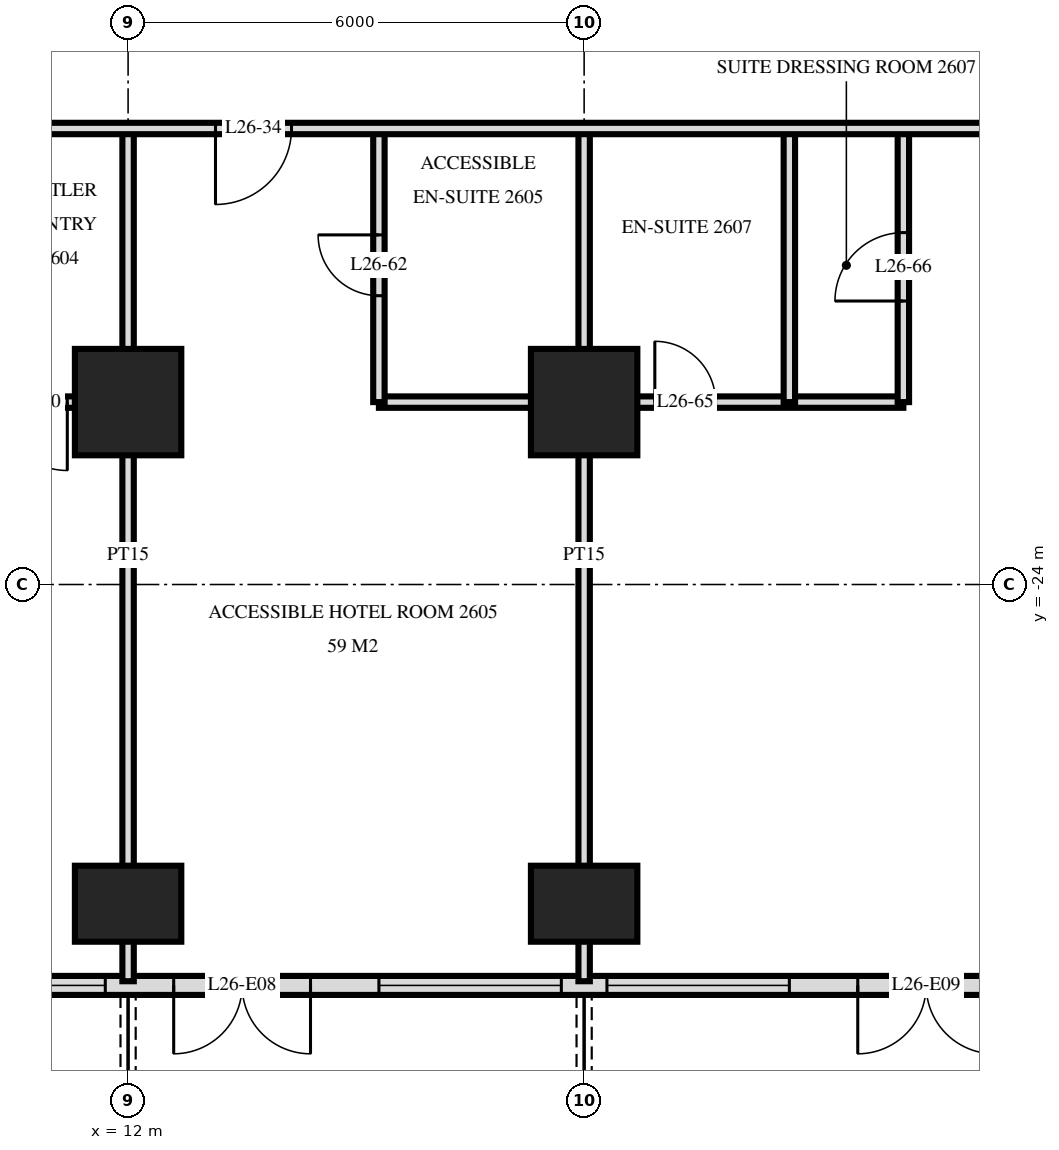
"""IFC4 building model, lengths in metres.
Left out: names, types, materials, properties, quantities, classifications, styles, units other than length and angle.
Written with IfcOpenShell. Run it as: python <this file> out.ifc"""

import sys

from ifc_helpers import new_model, si_unit, direction, frame, frame_2d, origin, origin_2d, place, context, subcontext, project, spatial, rectangle, extrude, element, fill, save


model = new_model("IFC4")
c1 = context("Model", 3, precision=1e-05, world=origin(), true_north=direction((0.0, 1.0)))
c2 = subcontext(c1, "Body", "Model", "MODEL_VIEW")
j1 = project(units=[si_unit("LENGTHUNIT", "METRE"), si_unit("PLANEANGLEUNIT", "RADIAN")], contexts=[c1])
p1 = place(None, origin())
s1 = spatial("IfcSite", under=j1, at=p1, CompositionType="ELEMENT")
p2 = place(p1, origin())
s2 = spatial("IfcBuilding", under=s1, at=p2, CompositionType="ELEMENT")
p3 = place(p2, frame((0.0, 0.0, 103.2)))
s3 = spatial("IfcBuildingStorey", under=s2, at=p3, CompositionType="ELEMENT", Elevation=103.2)
p4 = place(p3, frame((12.0, -28.2, 0.0), z_axis=(0.0, 0.0, 1.0), x_axis=(1.0, 0.0, 0.0)))
e1 = element("IfcColumn", 1, at=p4, inside=s3, PredefinedType="COLUMN", context=c2, shape_type="SweptSolid", body=[
    extrude(rectangle(XDim=1.4, YDim=1.0, at=origin_2d()), origin(), (0.0, 0.0, 1.0), 3.6),
])
p5 = place(p3, frame((12.0, -21.6, 0.0), z_axis=(0.0, 0.0, 1.0), x_axis=(1.0, 0.0, 0.0)))
e2 = element("IfcColumn", 2, at=p5, inside=s3, PredefinedType="COLUMN", context=c2, shape_type="SweptSolid", body=[
    extrude(rectangle(XDim=1.4, YDim=1.4, at=origin_2d()), origin(), (0.0, 0.0, 1.0), 3.6),
])
p6 = place(p3, frame((18.0, -28.2, 0.0), z_axis=(0.0, 0.0, 1.0), x_axis=(1.0, 0.0, 0.0)))
e3 = element("IfcColumn", 3, at=p6, inside=s3, PredefinedType="COLUMN", context=c2, shape_type="SweptSolid", body=[
    extrude(rectangle(XDim=1.4, YDim=1.0, at=origin_2d()), origin(), (0.0, 0.0, 1.0), 3.6),
])
p7 = place(p3, frame((18.0, -21.6, 0.0), z_axis=(0.0, 0.0, 1.0), x_axis=(1.0, 0.0, 0.0)))
e4 = element("IfcColumn", 4, at=p7, inside=s3, PredefinedType="COLUMN", context=c2, shape_type="SweptSolid", body=[
    extrude(rectangle(XDim=1.4, YDim=1.4, at=origin_2d()), origin(), (0.0, 0.0, 1.0), 3.6),
])
p8 = place(p3, frame((-28.775, -29.275, 0.0), z_axis=(0.0, 0.0, 1.0), x_axis=(1.0, 0.0, 0.0)))
e5 = element("IfcWall", 5, at=p8, inside=s3, PredefinedType="SOLIDWALL", context=c2, shape_type="SweptSolid", body=[
    extrude(rectangle(XDim=57.551, YDim=0.25, at=frame_2d((28.775, 0.0))), origin(), (0.0, 0.0, 1.0), 3.3),
])
p9 = place(p8, frame((0.575, 0.0, 0.0)))
e6 = element("IfcOpeningElement", 6, at=p9, cuts=e5, PredefinedType="OPENING", context=c2, shape_type="SweptSolid", body=[
    extrude(rectangle(XDim=1.8, YDim=2.4, at=frame_2d((0.9, 1.2))), frame((0.0, 0.135, 0.0), z_axis=(0.0, -1.0, 0.0), x_axis=(1.0, 0.0, 0.0)), (0.0, 0.0, 1.0), 0.27),
])
p10 = place(p8, frame((5.375, 0.0, 0.0)))
e7 = element("IfcOpeningElement", 7, at=p10, cuts=e5, PredefinedType="OPENING", context=c2, shape_type="SweptSolid", body=[
    extrude(rectangle(XDim=1.8, YDim=2.4, at=frame_2d((0.9, 1.2))), frame((0.0, 0.135, 0.0), z_axis=(0.0, -1.0, 0.0), x_axis=(1.0, 0.0, 0.0)), (0.0, 0.0, 1.0), 0.27),
])
p11 = place(p8, frame((8.075, 0.0, 0.3)))
e8 = element("IfcOpeningElement", 8, at=p11, cuts=e5, PredefinedType="OPENING", context=c2, shape_type="SweptSolid", body=[
    extrude(rectangle(XDim=2.4, YDim=2.1, at=frame_2d((1.2, 1.05))), frame((0.0, 0.135, 0.0), z_axis=(0.0, -1.0, 0.0), x_axis=(1.0, 0.0, 0.0)), (0.0, 0.0, 1.0), 0.27),
])
p12 = place(p8, frame((11.375, 0.0, 0.0)))
e9 = element("IfcOpeningElement", 9, at=p12, cuts=e5, PredefinedType="OPENING", context=c2, shape_type="SweptSolid", body=[
    extrude(rectangle(XDim=1.8, YDim=2.4, at=frame_2d((0.9, 1.2))), frame((0.0, 0.135, 0.0), z_axis=(0.0, -1.0, 0.0), x_axis=(1.0, 0.0, 0.0)), (0.0, 0.0, 1.0), 0.27),
])
p13 = place(p8, frame((14.075, 0.0, 0.3)))
e10 = element("IfcOpeningElement", 10, at=p13, cuts=e5, PredefinedType="OPENING", context=c2, shape_type="SweptSolid", body=[
    extrude(rectangle(XDim=2.4, YDim=2.1, at=frame_2d((1.2, 1.05))), frame((0.0, 0.135, 0.0), z_axis=(0.0, -1.0, 0.0), x_axis=(1.0, 0.0, 0.0)), (0.0, 0.0, 1.0), 0.27),
])
p14 = place(p8, frame((17.375, 0.0, 0.0)))
e11 = element("IfcOpeningElement", 11, at=p14, cuts=e5, PredefinedType="OPENING", context=c2, shape_type="SweptSolid", body=[
    extrude(rectangle(XDim=1.8, YDim=2.4, at=frame_2d((0.9, 1.2))), frame((0.0, 0.135, 0.0), z_axis=(0.0, -1.0, 0.0), x_axis=(1.0, 0.0, 0.0)), (0.0, 0.0, 1.0), 0.27),
])
p15 = place(p8, frame((20.075, 0.0, 0.3)))
e12 = element("IfcOpeningElement", 12, at=p15, cuts=e5, PredefinedType="OPENING", context=c2, shape_type="SweptSolid", body=[
    extrude(rectangle(XDim=2.4, YDim=2.1, at=frame_2d((1.2, 1.05))), frame((0.0, 0.135, 0.0), z_axis=(0.0, -1.0, 0.0), x_axis=(1.0, 0.0, 0.0)), (0.0, 0.0, 1.0), 0.27),
])
p16 = place(p8, frame((23.075, 0.0, 0.3)))
e13 = element("IfcOpeningElement", 13, at=p16, cuts=e5, PredefinedType="OPENING", context=c2, shape_type="SweptSolid", body=[
    extrude(rectangle(XDim=2.4, YDim=2.1, at=frame_2d((1.2, 1.05))), frame((0.0, 0.135, 0.0), z_axis=(0.0, -1.0, 0.0), x_axis=(1.0, 0.0, 0.0)), (0.0, 0.0, 1.0), 0.27),
])
p17 = place(p8, frame((26.375, 0.0, 0.0)))
e14 = element("IfcOpeningElement", 14, at=p17, cuts=e5, PredefinedType="OPENING", context=c2, shape_type="SweptSolid", body=[
    extrude(rectangle(XDim=1.8, YDim=2.4, at=frame_2d((0.9, 1.2))), frame((0.0, 0.135, 0.0), z_axis=(0.0, -1.0, 0.0), x_axis=(1.0, 0.0, 0.0)), (0.0, 0.0, 1.0), 0.27),
])
p18 = place(p8, frame((29.075, 0.0, 0.3)))
e15 = element("IfcOpeningElement", 15, at=p18, cuts=e5, PredefinedType="OPENING", context=c2, shape_type="SweptSolid", body=[
    extrude(rectangle(XDim=2.4, YDim=2.1, at=frame_2d((1.2, 1.05))), frame((0.0, 0.135, 0.0), z_axis=(0.0, -1.0, 0.0), x_axis=(1.0, 0.0, 0.0)), (0.0, 0.0, 1.0), 0.27),
])
p19 = place(p8, frame((32.375, 0.0, 0.0)))
e16 = element("IfcOpeningElement", 16, at=p19, cuts=e5, PredefinedType="OPENING", context=c2, shape_type="SweptSolid", body=[
    extrude(rectangle(XDim=1.8, YDim=2.4, at=frame_2d((0.9, 1.2))), frame((0.0, 0.135, 0.0), z_axis=(0.0, -1.0, 0.0), x_axis=(1.0, 0.0, 0.0)), (0.0, 0.0, 1.0), 0.27),
])
p20 = place(p8, frame((35.375, 0.0, 0.0)))
e17 = element("IfcOpeningElement", 17, at=p20, cuts=e5, PredefinedType="OPENING", context=c2, shape_type="SweptSolid", body=[
    extrude(rectangle(XDim=1.8, YDim=2.4, at=frame_2d((0.9, 1.2))), frame((0.0, 0.135, 0.0), z_axis=(0.0, -1.0, 0.0), x_axis=(1.0, 0.0, 0.0)), (0.0, 0.0, 1.0), 0.27),
])
p21 = place(p8, frame((38.075, 0.0, 0.3)))
e18 = element("IfcOpeningElement", 18, at=p21, cuts=e5, PredefinedType="OPENING", context=c2, shape_type="SweptSolid", body=[
    extrude(rectangle(XDim=2.4, YDim=2.1, at=frame_2d((1.2, 1.05))), frame((0.0, 0.135, 0.0), z_axis=(0.0, -1.0, 0.0), x_axis=(1.0, 0.0, 0.0)), (0.0, 0.0, 1.0), 0.27),
])
p22 = place(p8, frame((41.375, 0.0, 0.0)))
e19 = element("IfcOpeningElement", 19, at=p22, cuts=e5, PredefinedType="OPENING", context=c2, shape_type="SweptSolid", body=[
    extrude(rectangle(XDim=1.8, YDim=2.4, at=frame_2d((0.9, 1.2))), frame((0.0, 0.135, 0.0), z_axis=(0.0, -1.0, 0.0), x_axis=(1.0, 0.0, 0.0)), (0.0, 0.0, 1.0), 0.27),
])
p23 = place(p8, frame((44.075, 0.0, 0.3)))
e20 = element("IfcOpeningElement", 20, at=p23, cuts=e5, PredefinedType="OPENING", context=c2, shape_type="SweptSolid", body=[
    extrude(rectangle(XDim=2.4, YDim=2.1, at=frame_2d((1.2, 1.05))), frame((0.0, 0.135, 0.0), z_axis=(0.0, -1.0, 0.0), x_axis=(1.0, 0.0, 0.0)), (0.0, 0.0, 1.0), 0.27),
])
p24 = place(p8, frame((47.075, 0.0, 0.3)))
e21 = element("IfcOpeningElement", 21, at=p24, cuts=e5, PredefinedType="OPENING", context=c2, shape_type="SweptSolid", body=[
    extrude(rectangle(XDim=2.4, YDim=2.1, at=frame_2d((1.2, 1.05))), frame((0.0, 0.135, 0.0), z_axis=(0.0, -1.0, 0.0), x_axis=(1.0, 0.0, 0.0)), (0.0, 0.0, 1.0), 0.27),
])
p25 = place(p8, frame((50.375, 0.0, 0.0)))
e22 = element("IfcOpeningElement", 22, at=p25, cuts=e5, PredefinedType="OPENING", context=c2, shape_type="SweptSolid", body=[
    extrude(rectangle(XDim=1.8, YDim=2.4, at=frame_2d((0.9, 1.2))), frame((0.0, 0.135, 0.0), z_axis=(0.0, -1.0, 0.0), x_axis=(1.0, 0.0, 0.0)), (0.0, 0.0, 1.0), 0.27),
])
p26 = place(p8, frame((53.375, 0.0, 0.0)))
e23 = element("IfcOpeningElement", 23, at=p26, cuts=e5, PredefinedType="OPENING", context=c2, shape_type="SweptSolid", body=[
    extrude(rectangle(XDim=1.8, YDim=2.4, at=frame_2d((0.9, 1.2))), frame((0.0, 0.135, 0.0), z_axis=(0.0, -1.0, 0.0), x_axis=(1.0, 0.0, 0.0)), (0.0, 0.0, 1.0), 0.27),
])
p27 = place(p3, frame((22.2, -21.6, 0.0), z_axis=(0.0, 0.0, 1.0), x_axis=(0.0, 1.0, 0.0)))
e24 = element("IfcWall", 24, at=p27, inside=s3, PredefinedType="PARTITIONING", context=c2, shape_type="SweptSolid", body=[
    extrude(rectangle(XDim=3.6, YDim=0.15, at=frame_2d((1.8, 0.0))), origin(), (0.0, 0.0, 1.0), 3.32),
])
p28 = place(p27, frame((1.33, 0.0, 0.0)))
e25 = element("IfcOpeningElement", 25, at=p28, cuts=e24, PredefinedType="OPENING", context=c2, shape_type="SweptSolid", body=[
    extrude(rectangle(XDim=0.9, YDim=2.1, at=frame_2d((0.45, 1.05))), frame((0.0, 0.085, 0.0), z_axis=(0.0, -1.0, 0.0), x_axis=(1.0, 0.0, 0.0)), (0.0, 0.0, 1.0), 0.17),
])
p29 = place(p3, frame((20.7, -21.6, 0.0), z_axis=(0.0, 0.0, 1.0), x_axis=(0.0, 1.0, 0.0)))
e26 = element("IfcWall", 26, at=p29, inside=s3, PredefinedType="PARTITIONING", context=c2, shape_type="SweptSolid", body=[
    extrude(rectangle(XDim=3.6, YDim=0.15, at=frame_2d((1.8, 0.0))), origin(), (0.0, 0.0, 1.0), 3.32),
])
p30 = place(p3, frame((18.0, -29.22, 0.0), z_axis=(0.0, 0.0, 1.0), x_axis=(0.0, 1.0, 0.0)))
e27 = element("IfcWall", 27, at=p30, inside=s3, PredefinedType="PARTITIONING", context=c2, shape_type="SweptSolid", body=[
    extrude(rectangle(XDim=11.22, YDim=0.15, at=frame_2d((5.61, 0.0))), origin(), (0.0, 0.0, 1.0), 3.32),
])
p31 = place(p3, frame((15.3, -21.6, 0.0), z_axis=(0.0, 0.0, 1.0), x_axis=(0.0, 1.0, 0.0)))
e28 = element("IfcWall", 28, at=p31, inside=s3, PredefinedType="PARTITIONING", context=c2, shape_type="SweptSolid", body=[
    extrude(rectangle(XDim=3.6, YDim=0.15, at=frame_2d((1.8, 0.0))), origin(), (0.0, 0.0, 1.0), 3.32),
])
p32 = place(p31, frame((1.4, 0.0, 0.0)))
e29 = element("IfcOpeningElement", 29, at=p32, cuts=e28, PredefinedType="OPENING", context=c2, shape_type="SweptSolid", body=[
    extrude(rectangle(XDim=0.8, YDim=2.1, at=frame_2d((0.4, 1.05))), frame((0.0, 0.085, 0.0), z_axis=(0.0, -1.0, 0.0), x_axis=(1.0, 0.0, 0.0)), (0.0, 0.0, 1.0), 0.17),
])
p33 = place(p3, frame((12.0, -29.22, 0.0), z_axis=(0.0, 0.0, 1.0), x_axis=(0.0, 1.0, 0.0)))
e30 = element("IfcWall", 30, at=p33, inside=s3, PredefinedType="PARTITIONING", context=c2, shape_type="SweptSolid", body=[
    extrude(rectangle(XDim=11.22, YDim=0.15, at=frame_2d((5.61, 0.0))), origin(), (0.0, 0.0, 1.0), 3.32),
])
p34 = place(p3, frame((4.2, -21.6, 0.0), z_axis=(0.0, 0.0, 1.0), x_axis=(1.0, 0.0, 0.0)))
e31 = element("IfcWall", 31, at=p34, inside=s3, PredefinedType="PARTITIONING", context=c2, shape_type="SweptSolid", body=[
    extrude(rectangle(XDim=7.8, YDim=0.15, at=frame_2d((3.9, 0.0))), origin(), (0.0, 0.0, 1.0), 3.32),
])
p35 = place(p34, frame((0.2, 0.0, 0.0)))
e32 = element("IfcOpeningElement", 32, at=p35, cuts=e31, PredefinedType="OPENING", context=c2, shape_type="SweptSolid", body=[
    extrude(rectangle(XDim=0.8, YDim=2.1, at=frame_2d((0.4, 1.05))), frame((0.0, 0.085, 0.0), z_axis=(0.0, -1.0, 0.0), x_axis=(1.0, 0.0, 0.0)), (0.0, 0.0, 1.0), 0.17),
])
p36 = place(p34, frame((4.03, 0.0, 0.0)))
e33 = element("IfcOpeningElement", 33, at=p36, cuts=e31, PredefinedType="OPENING", context=c2, shape_type="SweptSolid", body=[
    extrude(rectangle(XDim=0.9, YDim=2.1, at=frame_2d((0.45, 1.05))), frame((0.0, 0.085, 0.0), z_axis=(0.0, -1.0, 0.0), x_axis=(1.0, 0.0, 0.0)), (0.0, 0.0, 1.0), 0.17),
])
p37 = place(p34, frame((6.1, 0.0, 0.0)))
e34 = element("IfcOpeningElement", 34, at=p37, cuts=e31, PredefinedType="OPENING", context=c2, shape_type="SweptSolid", body=[
    extrude(rectangle(XDim=0.9, YDim=2.1, at=frame_2d((0.45, 1.05))), frame((0.0, 0.085, 0.0), z_axis=(0.0, -1.0, 0.0), x_axis=(1.0, 0.0, 0.0)), (0.0, 0.0, 1.0), 0.17),
])
p38 = place(p3, frame((15.3, -21.6, 0.0), z_axis=(0.0, 0.0, 1.0), x_axis=(1.0, 0.0, 0.0)))
e35 = element("IfcWall", 35, at=p38, inside=s3, PredefinedType="PARTITIONING", context=c2, shape_type="SweptSolid", body=[
    extrude(rectangle(XDim=6.9, YDim=0.15, at=frame_2d((3.45, 0.0))), origin(), (0.0, 0.0, 1.0), 3.32),
])
p39 = place(p38, frame((3.63, 0.0, 0.0)))
e36 = element("IfcOpeningElement", 36, at=p39, cuts=e35, PredefinedType="OPENING", context=c2, shape_type="SweptSolid", body=[
    extrude(rectangle(XDim=0.8, YDim=2.1, at=frame_2d((0.4, 1.05))), frame((0.0, 0.085, 0.0), z_axis=(0.0, -1.0, 0.0), x_axis=(1.0, 0.0, 0.0)), (0.0, 0.0, 1.0), 0.17),
])
p40 = place(p3, frame((-33.12, -18.0, 0.0), z_axis=(0.0, 0.0, 1.0), x_axis=(1.0, 0.0, 0.0)))
e37 = element("IfcWall", 37, at=p40, inside=s3, PredefinedType="PARTITIONING", context=c2, shape_type="SweptSolid", body=[
    extrude(rectangle(XDim=66.24, YDim=0.15, at=frame_2d((33.12, 0.0))), origin(), (0.0, 0.0, 1.0), 3.32),
])
p41 = place(p40, frame((14.02, 0.0, 0.0)))
e38 = element("IfcOpeningElement", 38, at=p41, cuts=e37, PredefinedType="OPENING", context=c2, shape_type="SweptSolid", body=[
    extrude(rectangle(XDim=1.0, YDim=2.1, at=frame_2d((0.5, 1.05))), frame((0.0, 0.085, 0.0), z_axis=(0.0, -1.0, 0.0), x_axis=(1.0, 0.0, 0.0)), (0.0, 0.0, 1.0), 0.17),
])
p42 = place(p40, frame((18.82, 0.0, 0.0)))
e39 = element("IfcOpeningElement", 39, at=p42, cuts=e37, PredefinedType="OPENING", context=c2, shape_type="SweptSolid", body=[
    extrude(rectangle(XDim=1.0, YDim=2.1, at=frame_2d((0.5, 1.05))), frame((0.0, 0.085, 0.0), z_axis=(0.0, -1.0, 0.0), x_axis=(1.0, 0.0, 0.0)), (0.0, 0.0, 1.0), 0.17),
])
p43 = place(p40, frame((30.27, 0.0, 0.0)))
e40 = element("IfcOpeningElement", 40, at=p43, cuts=e37, PredefinedType="OPENING", context=c2, shape_type="SweptSolid", body=[
    extrude(rectangle(XDim=1.0, YDim=2.1, at=frame_2d((0.5, 1.05))), frame((0.0, 0.085, 0.0), z_axis=(0.0, -1.0, 0.0), x_axis=(1.0, 0.0, 0.0)), (0.0, 0.0, 1.0), 0.17),
])
p44 = place(p40, frame((33.82, 0.0, 0.0)))
e41 = element("IfcOpeningElement", 41, at=p44, cuts=e37, PredefinedType="OPENING", context=c2, shape_type="SweptSolid", body=[
    extrude(rectangle(XDim=1.0, YDim=2.1, at=frame_2d((0.5, 1.05))), frame((0.0, 0.085, 0.0), z_axis=(0.0, -1.0, 0.0), x_axis=(1.0, 0.0, 0.0)), (0.0, 0.0, 1.0), 0.17),
])
p45 = place(p40, frame((46.27, 0.0, 0.0)))
e42 = element("IfcOpeningElement", 42, at=p45, cuts=e37, PredefinedType="OPENING", context=c2, shape_type="SweptSolid", body=[
    extrude(rectangle(XDim=1.0, YDim=2.1, at=frame_2d((0.5, 1.05))), frame((0.0, 0.085, 0.0), z_axis=(0.0, -1.0, 0.0), x_axis=(1.0, 0.0, 0.0)), (0.0, 0.0, 1.0), 0.17),
])
p46 = place(p40, frame((6.07, 0.0, 0.0)))
e43 = element("IfcOpeningElement", 43, at=p46, cuts=e37, PredefinedType="OPENING", context=c2, shape_type="SweptSolid", body=[
    extrude(rectangle(XDim=1.0, YDim=2.1, at=frame_2d((0.5, 1.05))), frame((0.0, 0.085, 0.0), z_axis=(0.0, -1.0, 0.0), x_axis=(1.0, 0.0, 0.0)), (0.0, 0.0, 1.0), 0.17),
])
p47 = place(p40, frame((60.37, 0.0, 0.0)))
e44 = element("IfcOpeningElement", 44, at=p47, cuts=e37, PredefinedType="OPENING", context=c2, shape_type="SweptSolid", body=[
    extrude(rectangle(XDim=1.0, YDim=2.1, at=frame_2d((0.5, 1.05))), frame((0.0, 0.085, 0.0), z_axis=(0.0, -1.0, 0.0), x_axis=(1.0, 0.0, 0.0)), (0.0, 0.0, 1.0), 0.17),
])
p48 = place(p21, origin())
e45 = element("IfcWindow", 45, at=p48, inside=s3, PartitioningType="SINGLE_PANEL", PredefinedType="WINDOW", context=c2, shape_type="SweptSolid", body=[
    extrude(rectangle(XDim=2.4, YDim=2.1, at=frame_2d((1.2, 1.05))), frame((0.0, 0.03, 0.0), z_axis=(0.0, -1.0, 0.0), x_axis=(1.0, 0.0, 0.0)), (0.0, 0.0, 1.0), 0.06),
])
fill(e18, e45)
p49 = place(p22, frame((0.9, 0.0, 0.0), z_axis=(0.0, 0.0, 1.0), x_axis=(-1.0, 0.0, 0.0)))
e46 = element("IfcDoor", 46, at=p49, inside=s3, OperationType="DOUBLE_DOOR_SINGLE_SWING", PredefinedType="DOOR", context=c2, shape_type="SweptSolid", body=[
    extrude(rectangle(XDim=1.8, YDim=2.4, at=frame_2d((0.0, 1.2))), frame((0.0, -0.025, 0.0), z_axis=(0.0, 1.0, 0.0), x_axis=(-1.0, 0.0, 0.0)), (0.0, 0.0, 1.0), 0.05),
])
fill(e19, e46)
p50 = place(p23, origin())
e47 = element("IfcWindow", 47, at=p50, inside=s3, PartitioningType="SINGLE_PANEL", PredefinedType="WINDOW", context=c2, shape_type="SweptSolid", body=[
    extrude(rectangle(XDim=2.4, YDim=2.1, at=frame_2d((1.2, 1.05))), frame((0.0, 0.03, 0.0), z_axis=(0.0, -1.0, 0.0), x_axis=(1.0, 0.0, 0.0)), (0.0, 0.0, 1.0), 0.06),
])
fill(e20, e47)
p51 = place(p24, origin())
e48 = element("IfcWindow", 48, at=p51, inside=s3, PartitioningType="SINGLE_PANEL", PredefinedType="WINDOW", context=c2, shape_type="SweptSolid", body=[
    extrude(rectangle(XDim=2.4, YDim=2.1, at=frame_2d((1.2, 1.05))), frame((0.0, 0.03, 0.0), z_axis=(0.0, -1.0, 0.0), x_axis=(1.0, 0.0, 0.0)), (0.0, 0.0, 1.0), 0.06),
])
fill(e21, e48)
p52 = place(p25, frame((0.9, 0.0, 0.0), z_axis=(0.0, 0.0, 1.0), x_axis=(-1.0, 0.0, 0.0)))
e49 = element("IfcDoor", 49, at=p52, inside=s3, OperationType="DOUBLE_DOOR_SINGLE_SWING", PredefinedType="DOOR", context=c2, shape_type="SweptSolid", body=[
    extrude(rectangle(XDim=1.8, YDim=2.4, at=frame_2d((0.0, 1.2))), frame((0.0, -0.025, 0.0), z_axis=(0.0, 1.0, 0.0), x_axis=(-1.0, 0.0, 0.0)), (0.0, 0.0, 1.0), 0.05),
])
fill(e22, e49)
p53 = place(p45, frame((0.5, 0.0, 0.0), z_axis=(0.0, 0.0, 1.0), x_axis=(-1.0, 0.0, 0.0)))
e50 = element("IfcDoor", 50, at=p53, inside=s3, OperationType="SINGLE_SWING_LEFT", PredefinedType="DOOR", context=c2, shape_type="SweptSolid", body=[
    extrude(rectangle(XDim=1.0, YDim=2.1, at=frame_2d((0.0, 1.05))), frame((0.0, -0.025, 0.0), z_axis=(0.0, 1.0, 0.0), x_axis=(-1.0, 0.0, 0.0)), (0.0, 0.0, 1.0), 0.05),
])
fill(e42, e50)
p54 = place(p37, frame((0.45, 0.0, 0.0), z_axis=(0.0, 0.0, 1.0), x_axis=(-1.0, 0.0, 0.0)))
e51 = element("IfcDoor", 51, at=p54, inside=s3, OperationType="SINGLE_SWING_RIGHT", PredefinedType="DOOR", context=c2, shape_type="SweptSolid", body=[
    extrude(rectangle(XDim=0.9, YDim=2.1, at=frame_2d((0.0, 1.05))), frame((0.0, -0.025, 0.0), z_axis=(0.0, 1.0, 0.0), x_axis=(-1.0, 0.0, 0.0)), (0.0, 0.0, 1.0), 0.05),
])
fill(e34, e51)
p55 = place(p32, origin())
e52 = element("IfcDoor", 52, at=p55, inside=s3, OperationType="SINGLE_SWING_LEFT", PredefinedType="DOOR", context=c2, shape_type="SweptSolid", body=[
    extrude(rectangle(XDim=0.8, YDim=2.1, at=frame_2d((0.4, 1.05))), frame((0.0, 0.025, 0.0), z_axis=(0.0, -1.0, 0.0), x_axis=(1.0, 0.0, 0.0)), (0.0, 0.0, 1.0), 0.05),
])
fill(e29, e52)
p56 = place(p39, origin())
e53 = element("IfcDoor", 53, at=p56, inside=s3, OperationType="SINGLE_SWING_RIGHT", PredefinedType="DOOR", context=c2, shape_type="SweptSolid", body=[
    extrude(rectangle(XDim=0.8, YDim=2.1, at=frame_2d((0.4, 1.05))), frame((0.0, 0.025, 0.0), z_axis=(0.0, -1.0, 0.0), x_axis=(1.0, 0.0, 0.0)), (0.0, 0.0, 1.0), 0.05),
])
fill(e36, e53)
p57 = place(p28, origin())
e54 = element("IfcDoor", 54, at=p57, inside=s3, OperationType="SINGLE_SWING_RIGHT", PredefinedType="DOOR", context=c2, shape_type="SweptSolid", body=[
    extrude(rectangle(XDim=0.9, YDim=2.1, at=frame_2d((0.45, 1.05))), frame((0.0, 0.025, 0.0), z_axis=(0.0, -1.0, 0.0), x_axis=(1.0, 0.0, 0.0)), (0.0, 0.0, 1.0), 0.05),
])
fill(e25, e54)
save(model, sys.argv[1])
